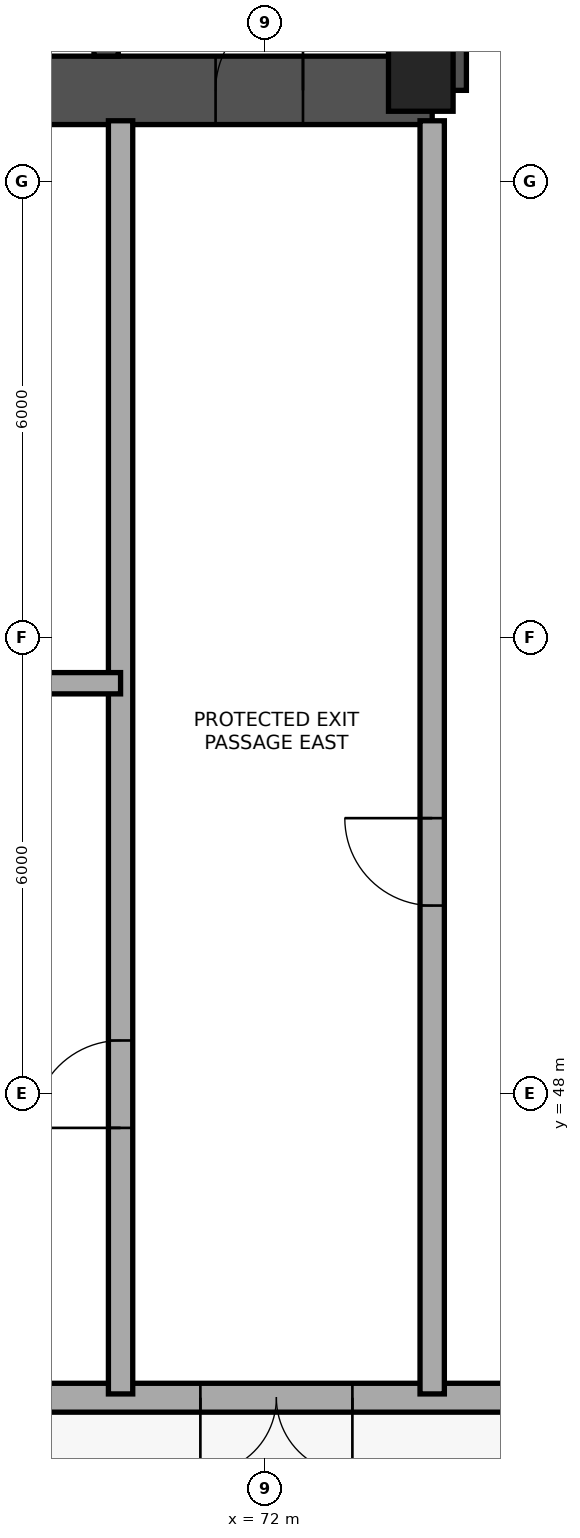
"""IFC4 building model, lengths in metres.
Left out: names, types, materials, properties, quantities, classifications, styles, units other than length and angle.
Written with IfcOpenShell. Run it as: python <this file> out.ifc"""

import sys

from ifc_helpers import new_model, si_unit, direction, frame, frame_2d, origin, origin_2d, place, context, subcontext, project, spatial, rectangle, extrude, element, fill, save


model = new_model("IFC4")
c1 = context("Model", 3, precision=1e-05, world=origin(), true_north=direction((0.0, 1.0)))
c2 = subcontext(c1, "Body", "Model", "MODEL_VIEW")
j1 = project(units=[si_unit("LENGTHUNIT", "METRE"), si_unit("PLANEANGLEUNIT", "RADIAN")], contexts=[c1])
p1 = place(None, origin())
s1 = spatial("IfcSite", under=j1, at=p1, CompositionType="ELEMENT")
p2 = place(p1, origin())
s2 = spatial("IfcBuilding", under=s1, at=p2, CompositionType="ELEMENT")
p3 = place(p2, origin())
s3 = spatial("IfcBuildingStorey", under=s2, at=p3, CompositionType="ELEMENT", Elevation=0.0)
p4 = place(p3, frame((57.8, 61.2, 0.0), z_axis=(0.0, 0.0, 1.0), x_axis=(1.0, 0.0, 0.0)))
e1 = element("IfcWall", 1, at=p4, inside=s3, PredefinedType="SHEAR", context=c2, shape_type="SweptSolid", body=[
    extrude(rectangle(XDim=16.4, YDim=0.9, at=frame_2d((8.2, 0.0))), origin(), (0.0, 0.0, 1.0), 5.4),
])
p5 = place(p4, frame((1.35, 0.0, 0.0)))
e2 = element("IfcOpeningElement", 2, at=p5, cuts=e1, PredefinedType="OPENING", context=c2, shape_type="SweptSolid", body=[
    extrude(rectangle(XDim=1.15, YDim=2.15, at=frame_2d((0.575, 1.075))), frame((0.0, 0.46, 0.0), z_axis=(0.0, -1.0, 0.0), x_axis=(1.0, 0.0, 0.0)), (0.0, 0.0, 1.0), 0.92),
])
p6 = place(p4, frame((6.1, 0.0, 0.0)))
e3 = element("IfcOpeningElement", 3, at=p6, cuts=e1, PredefinedType="OPENING", context=c2, shape_type="SweptSolid", body=[
    extrude(rectangle(XDim=1.6, YDim=2.15, at=frame_2d((0.8, 1.075))), frame((0.0, 0.46, 0.0), z_axis=(0.0, -1.0, 0.0), x_axis=(1.0, 0.0, 0.0)), (0.0, 0.0, 1.0), 0.92),
])
p7 = place(p4, frame((13.55, 0.0, 0.0)))
e4 = element("IfcOpeningElement", 4, at=p7, cuts=e1, PredefinedType="OPENING", context=c2, shape_type="SweptSolid", body=[
    extrude(rectangle(XDim=1.15, YDim=2.15, at=frame_2d((0.575, 1.075))), frame((0.0, 0.46, 0.0), z_axis=(0.0, -1.0, 0.0), x_axis=(1.0, 0.0, 0.0)), (0.0, 0.0, 1.0), 0.92),
])
p8 = place(p3, frame((74.2, 61.2, 0.0), z_axis=(0.0, 0.0, 1.0), x_axis=(0.0, 1.0, 0.0)))
e5 = element("IfcWall", 5, at=p8, inside=s3, PredefinedType="SHEAR", context=c2, shape_type="SweptSolid", body=[
    extrude(rectangle(XDim=13.6, YDim=0.9, at=frame_2d((6.8, 0.0))), origin(), (0.0, 0.0, 1.0), 5.4),
])
p9 = place(p3, frame((69.91, 61.65, 0.0), z_axis=(0.0, 0.0, 1.0), x_axis=(0.0, 1.0, 0.0)))
e6 = element("IfcWall", 6, at=p9, inside=s3, PredefinedType="SHEAR", context=c2, shape_type="SweptSolid", body=[
    extrude(rectangle(XDim=12.7, YDim=0.32, at=frame_2d((6.35, 0.0))), origin(), (0.0, 0.0, 1.0), 5.4),
])
p10 = place(p9, frame((8.75, 0.0, 0.0)))
e7 = element("IfcOpeningElement", 7, at=p10, cuts=e6, PredefinedType="OPENING", context=c2, shape_type="SweptSolid", body=[
    extrude(rectangle(XDim=0.92, YDim=2.05, at=frame_2d((0.46, 1.025))), frame((0.0, 0.17, 0.0), z_axis=(0.0, -1.0, 0.0), x_axis=(1.0, 0.0, 0.0)), (0.0, 0.0, 1.0), 0.34),
])
p11 = place(p3, frame((74.05, 61.35, 0.0), z_axis=(0.0, 0.0, 1.0), x_axis=(1.0, 0.0, 0.0)))
e8 = element("IfcColumn", 8, at=p11, inside=s3, PredefinedType="COLUMN", context=c2, shape_type="SweptSolid", body=[
    extrude(rectangle(XDim=0.85, YDim=0.85, at=origin_2d()), origin(), (0.0, 0.0, 1.0), 5.4),
])
p12 = place(p3, frame((83.5, 44.0, 0.0), z_axis=(0.0, 0.0, 1.0), x_axis=(-1.0, 0.0, 0.0)))
e9 = element("IfcWall", 9, at=p12, inside=s3, PredefinedType="STANDARD", context=c2, shape_type="SweptSolid", body=[
    extrude(rectangle(XDim=35.0, YDim=0.38, at=frame_2d((17.5, 0.0))), origin(), (0.0, 0.0, 1.0), 4.08),
])
p13 = place(p12, frame((3.5, 0.0, 0.0)))
e10 = element("IfcOpeningElement", 10, at=p13, cuts=e9, PredefinedType="OPENING", context=c2, shape_type="SweptSolid", body=[
    extrude(rectangle(XDim=2.0, YDim=2.25, at=frame_2d((1.0, 1.125))), frame((0.0, 0.2, 0.0), z_axis=(0.0, -1.0, 0.0), x_axis=(1.0, 0.0, 0.0)), (0.0, 0.0, 1.0), 0.4),
])
p14 = place(p12, frame((10.35, 0.0, 0.0)))
e11 = element("IfcOpeningElement", 11, at=p14, cuts=e9, PredefinedType="OPENING", context=c2, shape_type="SweptSolid", body=[
    extrude(rectangle(XDim=2.0, YDim=2.25, at=frame_2d((1.0, 1.125))), frame((0.0, 0.2, 0.0), z_axis=(0.0, -1.0, 0.0), x_axis=(1.0, 0.0, 0.0)), (0.0, 0.0, 1.0), 0.4),
])
p15 = place(p12, frame((16.4, 0.0, 0.0)))
e12 = element("IfcOpeningElement", 12, at=p15, cuts=e9, PredefinedType="OPENING", context=c2, shape_type="SweptSolid", body=[
    extrude(rectangle(XDim=2.2, YDim=2.6, at=frame_2d((1.1, 1.3))), frame((0.0, 0.2, 0.0), z_axis=(0.0, -1.0, 0.0), x_axis=(1.0, 0.0, 0.0)), (0.0, 0.0, 1.0), 0.4),
])
p16 = place(p12, frame((22.65, 0.0, 0.0)))
e13 = element("IfcOpeningElement", 13, at=p16, cuts=e9, PredefinedType="OPENING", context=c2, shape_type="SweptSolid", body=[
    extrude(rectangle(XDim=2.0, YDim=2.25, at=frame_2d((1.0, 1.125))), frame((0.0, 0.2, 0.0), z_axis=(0.0, -1.0, 0.0), x_axis=(1.0, 0.0, 0.0)), (0.0, 0.0, 1.0), 0.4),
])
p17 = place(p12, frame((29.2, 0.0, 0.0)))
e14 = element("IfcOpeningElement", 14, at=p17, cuts=e9, PredefinedType="OPENING", context=c2, shape_type="SweptSolid", body=[
    extrude(rectangle(XDim=2.0, YDim=2.25, at=frame_2d((1.0, 1.125))), frame((0.0, 0.2, 0.0), z_axis=(0.0, -1.0, 0.0), x_axis=(1.0, 0.0, 0.0)), (0.0, 0.0, 1.0), 0.4),
])
p18 = place(p3, frame((70.1, 44.05, 0.0), z_axis=(0.0, 0.0, 1.0), x_axis=(0.0, 1.0, 0.0)))
e15 = element("IfcWall", 15, at=p18, inside=s3, PredefinedType="STANDARD", context=c2, shape_type="SweptSolid", body=[
    extrude(rectangle(XDim=16.75, YDim=0.32, at=frame_2d((8.375, 0.0))), origin(), (0.0, 0.0, 1.0), 4.08),
])
p19 = place(p18, frame((3.5, 0.0, 0.0)))
e16 = element("IfcOpeningElement", 16, at=p19, cuts=e15, PredefinedType="OPENING", context=c2, shape_type="SweptSolid", body=[
    extrude(rectangle(XDim=1.15, YDim=2.15, at=frame_2d((0.575, 1.075))), frame((0.0, 0.17, 0.0), z_axis=(0.0, -1.0, 0.0), x_axis=(1.0, 0.0, 0.0)), (0.0, 0.0, 1.0), 0.34),
])
p20 = place(p3, frame((74.2, 44.05, 0.0), z_axis=(0.0, 0.0, 1.0), x_axis=(0.0, 1.0, 0.0)))
e17 = element("IfcWall", 17, at=p20, inside=s3, PredefinedType="STANDARD", context=c2, shape_type="SweptSolid", body=[
    extrude(rectangle(XDim=16.75, YDim=0.32, at=frame_2d((8.375, 0.0))), origin(), (0.0, 0.0, 1.0), 4.08),
])
p21 = place(p20, frame((6.425, 0.0, 0.0)))
e18 = element("IfcOpeningElement", 18, at=p21, cuts=e17, PredefinedType="OPENING", context=c2, shape_type="SweptSolid", body=[
    extrude(rectangle(XDim=1.15, YDim=2.15, at=frame_2d((0.575, 1.075))), frame((0.0, 0.17, 0.0), z_axis=(0.0, -1.0, 0.0), x_axis=(1.0, 0.0, 0.0)), (0.0, 0.0, 1.0), 0.34),
])
p22 = place(p3, frame((61.9, 53.4, 0.0), z_axis=(0.0, 0.0, 1.0), x_axis=(1.0, 0.0, 0.0)))
e19 = element("IfcWall", 19, at=p22, inside=s3, PredefinedType="STANDARD", context=c2, shape_type="SweptSolid", body=[
    extrude(rectangle(XDim=8.2, YDim=0.28, at=frame_2d((4.1, 0.0))), origin(), (0.0, 0.0, 1.0), 4.08),
])
p23 = place(p22, frame((2.3, 0.0, 0.0)))
e20 = element("IfcOpeningElement", 20, at=p23, cuts=e19, PredefinedType="OPENING", context=c2, shape_type="SweptSolid", body=[
    extrude(rectangle(XDim=1.6, YDim=2.15, at=frame_2d((0.8, 1.075))), frame((0.0, 0.15, 0.0), z_axis=(0.0, -1.0, 0.0), x_axis=(1.0, 0.0, 0.0)), (0.0, 0.0, 1.0), 0.3),
])
p24 = place(p14, origin())
e21 = element("IfcDoor", 21, at=p24, inside=s3, OperationType="DOUBLE_DOOR_SINGLE_SWING", PredefinedType="DOOR", context=c2, shape_type="SweptSolid", body=[
    extrude(rectangle(XDim=2.0, YDim=2.25, at=frame_2d((1.0, 1.125))), frame((0.0, 0.025, 0.0), z_axis=(0.0, -1.0, 0.0), x_axis=(1.0, 0.0, 0.0)), (0.0, 0.0, 1.0), 0.05),
])
fill(e11, e21)
p25 = place(p7, origin())
e22 = element("IfcDoor", 22, at=p25, inside=s3, OperationType="SINGLE_SWING_RIGHT", PredefinedType="DOOR", context=c2, shape_type="SweptSolid", body=[
    extrude(rectangle(XDim=1.15, YDim=2.15, at=frame_2d((0.575, 1.075))), frame((0.0, 0.025, 0.0), z_axis=(0.0, -1.0, 0.0), x_axis=(1.0, 0.0, 0.0)), (0.0, 0.0, 1.0), 0.05),
])
fill(e4, e22)
p26 = place(p19, origin())
e23 = element("IfcDoor", 23, at=p26, inside=s3, OperationType="SINGLE_SWING_LEFT", PredefinedType="DOOR", context=c2, shape_type="SweptSolid", body=[
    extrude(rectangle(XDim=1.15, YDim=2.15, at=frame_2d((0.575, 1.075))), frame((0.0, 0.025, 0.0), z_axis=(0.0, -1.0, 0.0), x_axis=(1.0, 0.0, 0.0)), (0.0, 0.0, 1.0), 0.05),
])
fill(e16, e23)
p27 = place(p21, origin())
e24 = element("IfcDoor", 24, at=p27, inside=s3, OperationType="SINGLE_SWING_RIGHT", PredefinedType="DOOR", context=c2, shape_type="SweptSolid", body=[
    extrude(rectangle(XDim=1.15, YDim=2.15, at=frame_2d((0.575, 1.075))), frame((0.0, 0.025, 0.0), z_axis=(0.0, -1.0, 0.0), x_axis=(1.0, 0.0, 0.0)), (0.0, 0.0, 1.0), 0.05),
])
fill(e18, e24)
save(model, sys.argv[1])
